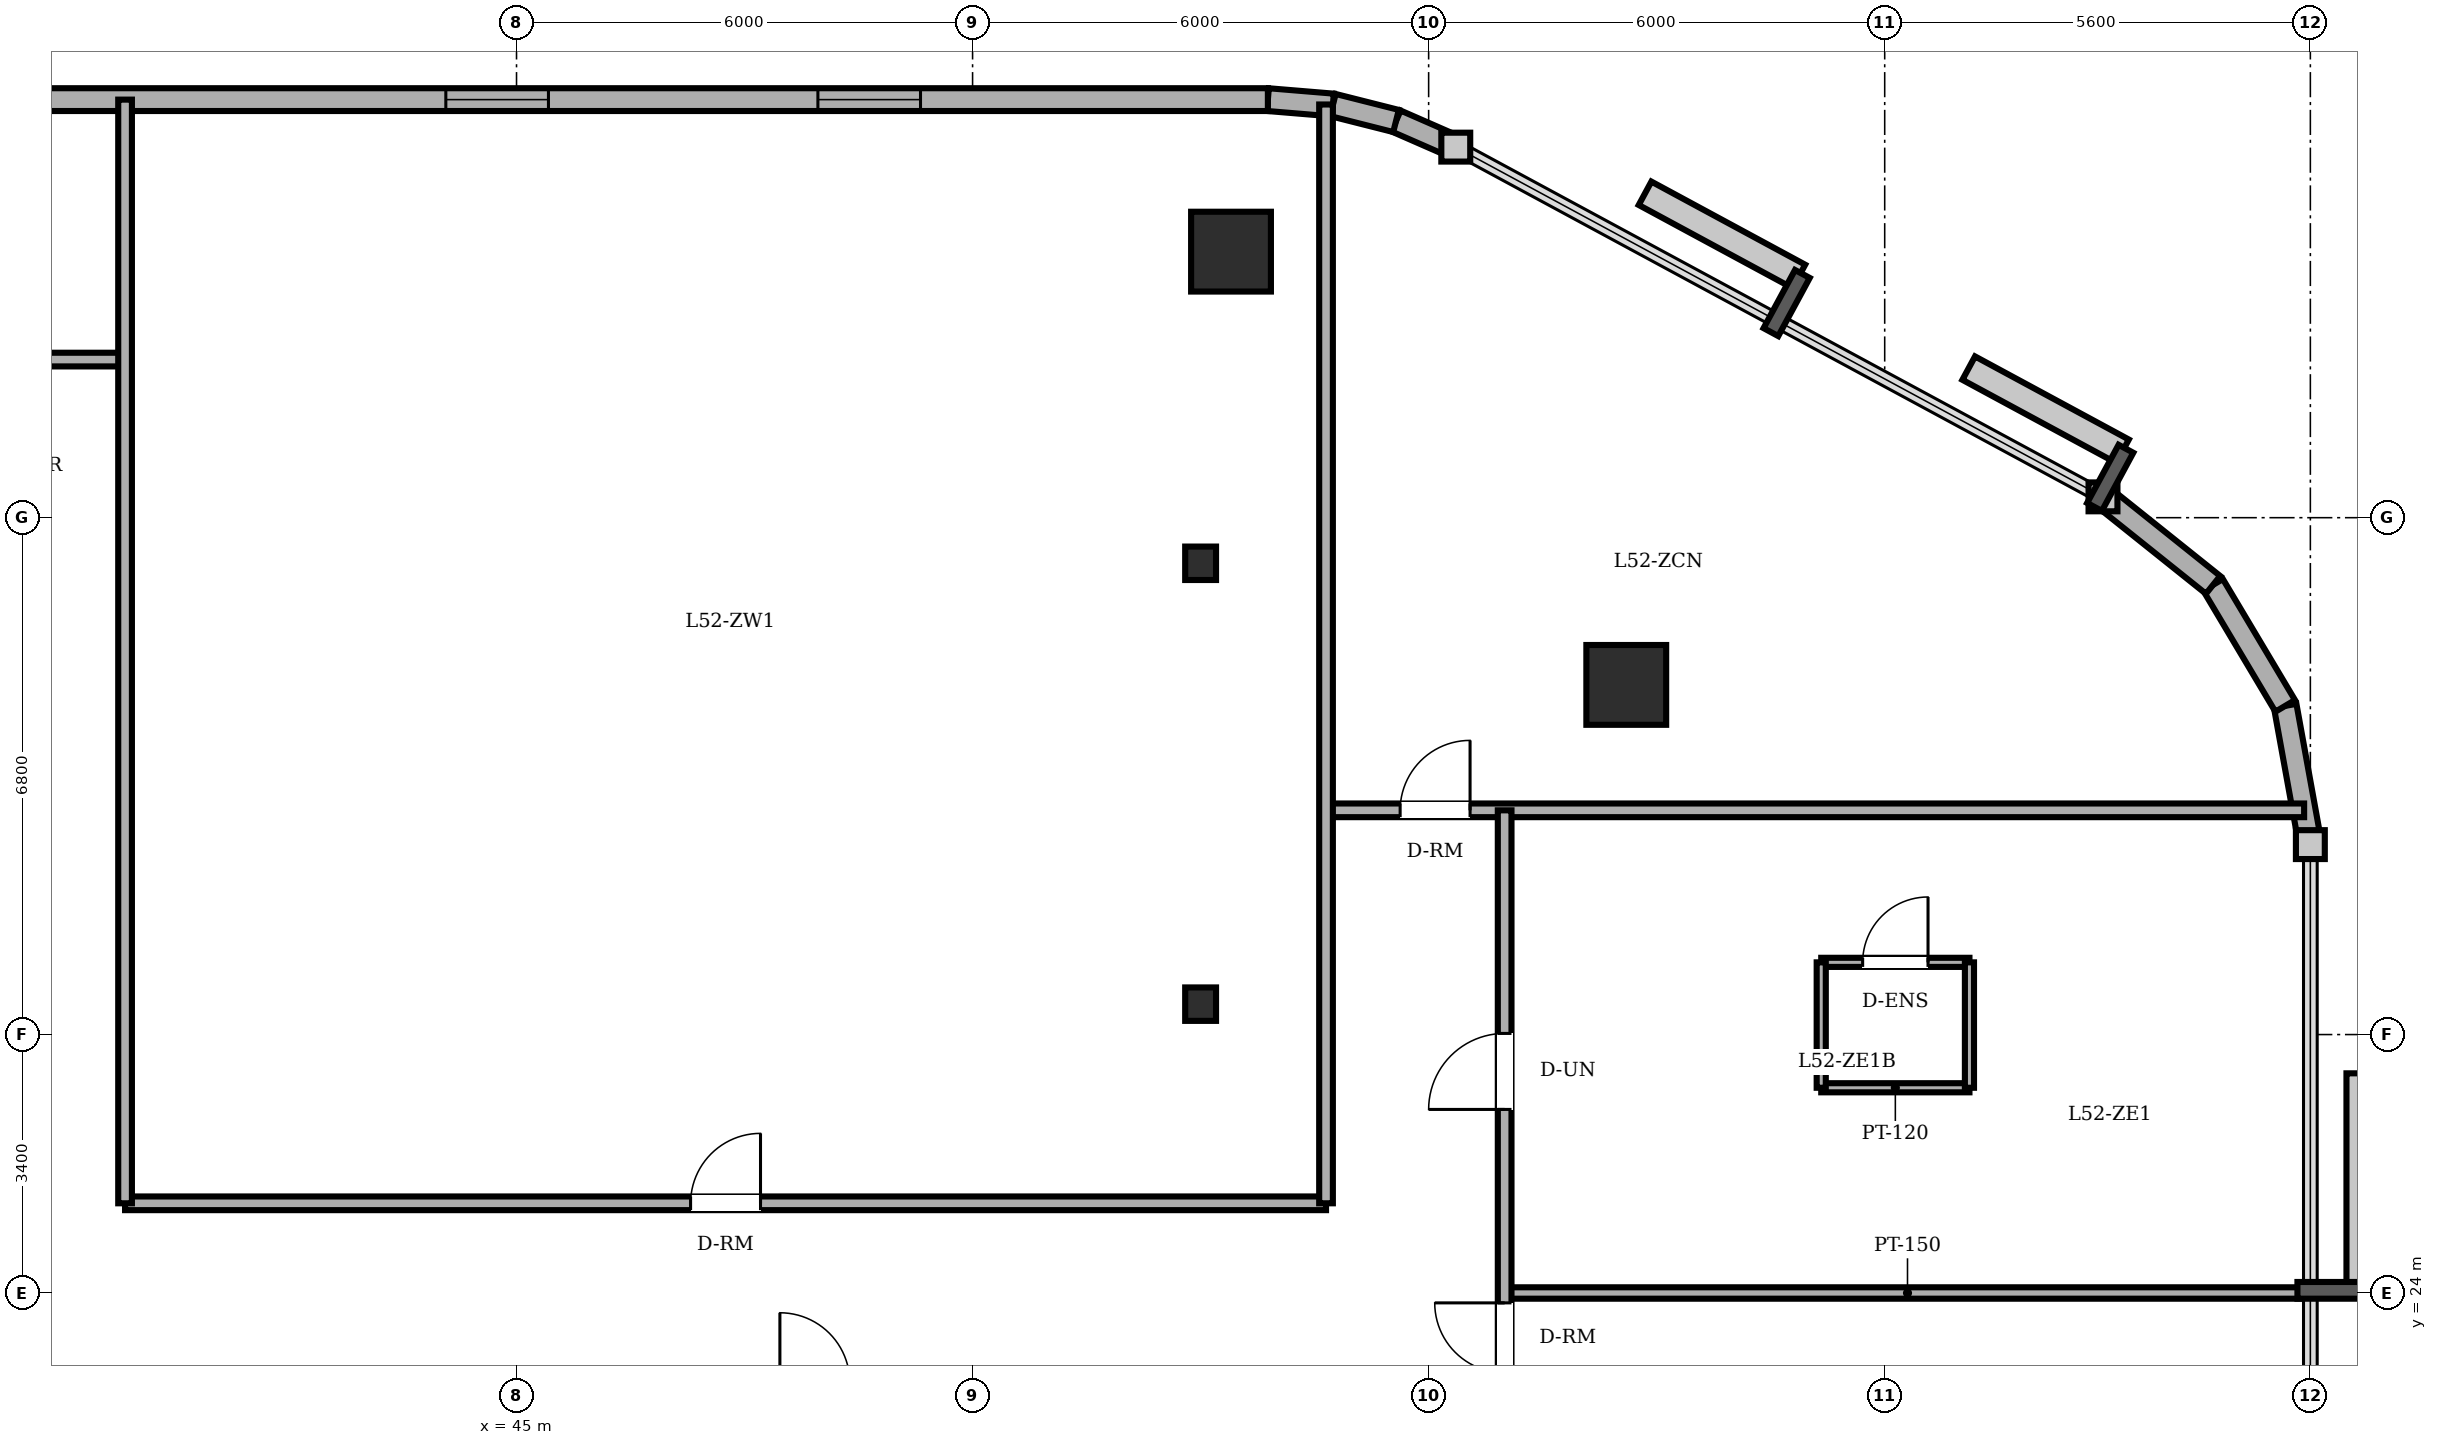
"""IFC4 building model, lengths in metres.
Left out: names, types, materials, properties, quantities, classifications, styles, units other than length and angle.
Written with IfcOpenShell. Run it as: python <this file> out.ifc"""

import sys

from ifc_helpers import new_model, si_unit, direction, frame, frame_2d, origin, origin_2d, place, context, subcontext, project, spatial, rectangle, circle, i_section, extrude, element, fill, save


model = new_model("IFC4")
c1 = context("Model", 3, precision=1e-05, world=origin(), true_north=direction((0.0, 1.0)))
c2 = subcontext(c1, "Body", "Model", "MODEL_VIEW")
j1 = project(units=[si_unit("LENGTHUNIT", "METRE"), si_unit("PLANEANGLEUNIT", "RADIAN")], contexts=[c1])
p1 = place(None, origin())
s1 = spatial("IfcSite", under=j1, at=p1, CompositionType="ELEMENT")
p2 = place(p1, origin())
s2 = spatial("IfcBuilding", under=s1, at=p2, CompositionType="ELEMENT")
p3 = place(p2, frame((0.0, 0.0, 201.3)))
s3 = spatial("IfcBuildingStorey", under=s2, at=p3, CompositionType="ELEMENT", Elevation=201.3)
for number, where, z_axis, x_axis in (
    (1, (59.6, 32.0, 0.0), (0.0, 0.0, 1.0), (1.0, 0.0, 0.0)),
    (2, (54.4, 37.7, 0.0), (0.0, 0.0, 1.0), (1.0, 0.0, 0.0)),
):
    element("IfcColumn", number, at=place(p3, frame(where, z_axis=z_axis, x_axis=x_axis)), inside=s3, PredefinedType="COLUMN", context=c2, shape_type="SweptSolid", body=[
        extrude(circle(Radius=0.525, at=origin_2d()), origin(), (0.0, 0.0, 1.0), 3.6),
    ])
for number, where, z_axis, x_axis in (
    (3, (54.0, 27.8, 0.0), (0.0, 0.0, 1.0), (1.0, 0.0, 0.0)),
    (4, (54.0, 33.6, 0.0), (0.0, 0.0, 1.0), (1.0, 0.0, 0.0)),
):
    element("IfcColumn", number, at=place(p3, frame(where, z_axis=z_axis, x_axis=x_axis)), inside=s3, PredefinedType="COLUMN", context=c2, shape_type="SweptSolid", body=[
        extrude(i_section(OverallWidth=0.406, OverallDepth=0.44, WebThickness=0.024, FlangeThickness=0.039, FilletRadius=0.015, at=origin_2d()), origin(), (0.0, 0.0, 1.0), 3.6),
    ])
p4 = place(p3, frame((68.6, 29.899, 0.0), z_axis=(0.0, 0.0, 1.0), x_axis=(-0.178468469252, 0.983945631365, 0.0)))
e5 = element("IfcWall", 5, at=p4, inside=s3, PredefinedType="SOLIDWALL", context=c2, shape_type="SweptSolid", body=[
    extrude(rectangle(XDim=1.855, YDim=0.3, at=frame_2d((0.927, 0.0))), origin(), (0.0, 0.0, 1.0), 3.4),
])
p5 = place(p3, frame((68.269, 31.724, 0.0), z_axis=(0.0, 0.0, 1.0), x_axis=(-0.512072018927, 0.858942516955, 0.0)))
e6 = element("IfcWall", 6, at=p5, inside=s3, PredefinedType="SOLIDWALL", context=c2, shape_type="SweptSolid", body=[
    extrude(rectangle(XDim=1.853, YDim=0.3, at=frame_2d((0.927, 0.0))), origin(), (0.0, 0.0, 1.0), 3.4),
])
p6 = place(p3, frame((67.32, 33.316, 0.0), z_axis=(0.0, 0.0, 1.0), x_axis=(-0.780920189257, 0.624630817372, 0.0)))
e7 = element("IfcWall", 7, at=p6, inside=s3, PredefinedType="SOLIDWALL", context=c2, shape_type="SweptSolid", body=[
    extrude(rectangle(XDim=1.854, YDim=0.3, at=frame_2d((0.927, 0.0))), origin(), (0.0, 0.0, 1.0), 3.4),
])
p7 = place(p3, frame((57.357, 39.075, 0.0), z_axis=(0.0, 0.0, 1.0), x_axis=(-0.916085473636, 0.400983048261, 0.0)))
e8 = element("IfcWall", 8, at=p7, inside=s3, PredefinedType="SOLIDWALL", context=c2, shape_type="SweptSolid", body=[
    extrude(rectangle(XDim=0.858, YDim=0.3, at=frame_2d((0.429, 0.0))), origin(), (0.0, 0.0, 1.0), 3.4),
])
p8 = place(p3, frame((56.571, 39.419, 0.0), z_axis=(0.0, 0.0, 1.0), x_axis=(-0.969536346338, 0.244947490555, 0.0)))
e9 = element("IfcWall", 9, at=p8, inside=s3, PredefinedType="SOLIDWALL", context=c2, shape_type="SweptSolid", body=[
    extrude(rectangle(XDim=0.857, YDim=0.3, at=frame_2d((0.429, 0.0))), origin(), (0.0, 0.0, 1.0), 3.4),
])
p9 = place(p3, frame((55.74, 39.629, 0.0), z_axis=(0.0, 0.0, 1.0), x_axis=(-0.996565355958, 0.082809971041, 0.0)))
e10 = element("IfcWall", 10, at=p9, inside=s3, PredefinedType="SOLIDWALL", context=c2, shape_type="SweptSolid", body=[
    extrude(rectangle(XDim=0.858, YDim=0.3, at=frame_2d((0.429, 0.0))), origin(), (0.0, 0.0, 1.0), 3.4),
])
p10 = place(p3, frame((54.885, 39.7, 0.0), z_axis=(0.0, 0.0, 1.0), x_axis=(-1.0, 0.0, 0.0)))
e11 = element("IfcWall", 11, at=p10, inside=s3, PredefinedType="SOLIDWALL", context=c2, shape_type="SweptSolid", body=[
    extrude(rectangle(XDim=32.485, YDim=0.3, at=frame_2d((16.243, 0.0))), origin(), (0.0, 0.0, 1.0), 3.4),
])
p11 = place(p10, frame((24.922, 0.0, 0.0)))
e12 = element("IfcOpeningElement", 12, at=p11, cuts=e11, PredefinedType="OPENING", context=c2, shape_type="SweptSolid", body=[
    extrude(rectangle(XDim=0.95, YDim=2.2, at=frame_2d((0.475, 1.1))), frame((0.0, 0.16, 0.0), z_axis=(0.0, -1.0, 0.0), x_axis=(1.0, 0.0, 0.0)), (0.0, 0.0, 1.0), 0.32),
])
p12 = place(p10, frame((4.57, 0.0, 0.85)))
e13 = element("IfcOpeningElement", 13, at=p12, cuts=e11, PredefinedType="OPENING", context=c2, shape_type="SweptSolid", body=[
    extrude(rectangle(XDim=1.35, YDim=1.55, at=frame_2d((0.675, 0.775))), frame((0.0, 0.16, 0.0), z_axis=(0.0, -1.0, 0.0), x_axis=(1.0, 0.0, 0.0)), (0.0, 0.0, 1.0), 0.32),
])
p13 = place(p10, frame((9.465, 0.0, 0.85)))
e14 = element("IfcOpeningElement", 14, at=p13, cuts=e11, PredefinedType="OPENING", context=c2, shape_type="SweptSolid", body=[
    extrude(rectangle(XDim=1.35, YDim=1.55, at=frame_2d((0.675, 0.775))), frame((0.0, 0.16, 0.0), z_axis=(0.0, -1.0, 0.0), x_axis=(1.0, 0.0, 0.0)), (0.0, 0.0, 1.0), 0.32),
])
p14 = place(p10, frame((17.043, 0.0, 0.85)))
e15 = element("IfcOpeningElement", 15, at=p14, cuts=e11, PredefinedType="OPENING", context=c2, shape_type="SweptSolid", body=[
    extrude(rectangle(XDim=1.35, YDim=1.55, at=frame_2d((0.675, 0.775))), frame((0.0, 0.16, 0.0), z_axis=(0.0, -1.0, 0.0), x_axis=(1.0, 0.0, 0.0)), (0.0, 0.0, 1.0), 0.32),
])
p15 = place(p10, frame((19.727, 0.0, 0.85)))
e16 = element("IfcOpeningElement", 16, at=p15, cuts=e11, PredefinedType="OPENING", context=c2, shape_type="SweptSolid", body=[
    extrude(rectangle(XDim=1.35, YDim=1.55, at=frame_2d((0.675, 0.775))), frame((0.0, 0.16, 0.0), z_axis=(0.0, -1.0, 0.0), x_axis=(1.0, 0.0, 0.0)), (0.0, 0.0, 1.0), 0.32),
])
p16 = place(p10, frame((27.91, 0.0, 0.85)))
e17 = element("IfcOpeningElement", 17, at=p16, cuts=e11, PredefinedType="OPENING", context=c2, shape_type="SweptSolid", body=[
    extrude(rectangle(XDim=1.35, YDim=1.55, at=frame_2d((0.675, 0.775))), frame((0.0, 0.16, 0.0), z_axis=(0.0, -1.0, 0.0), x_axis=(1.0, 0.0, 0.0)), (0.0, 0.0, 1.0), 0.32),
])
p17 = place(p10, frame((30.58, 0.0, 0.85)))
e18 = element("IfcOpeningElement", 18, at=p17, cuts=e11, PredefinedType="OPENING", context=c2, shape_type="SweptSolid", body=[
    extrude(rectangle(XDim=1.05, YDim=1.55, at=frame_2d((0.525, 0.775))), frame((0.0, 0.16, 0.0), z_axis=(0.0, -1.0, 0.0), x_axis=(1.0, 0.0, 0.0)), (0.0, 0.0, 1.0), 0.32),
])
p18 = place(p3, frame((62.165, 28.35, 0.0), z_axis=(0.0, 0.0, 1.0), x_axis=(1.0, 0.0, 0.0)))
e19 = element("IfcWall", 19, at=p18, inside=s3, PredefinedType="PARTITIONING", context=c2, shape_type="SweptSolid", body=[
    extrude(rectangle(XDim=1.95, YDim=0.12, at=frame_2d((0.975, 0.0))), origin(), (0.0, 0.0, 1.0), 3.4),
])
p19 = place(p18, frame((0.545, 0.0, 0.0)))
e20 = element("IfcOpeningElement", 20, at=p19, cuts=e19, PredefinedType="OPENING", context=c2, shape_type="SweptSolid", body=[
    extrude(rectangle(XDim=0.86, YDim=2.1, at=frame_2d((0.43, 1.05))), frame((0.0, 0.07, 0.0), z_axis=(0.0, -1.0, 0.0), x_axis=(1.0, 0.0, 0.0)), (0.0, 0.0, 1.0), 0.14),
])
p20 = place(p3, frame((64.115, 26.7, 0.0), z_axis=(0.0, 0.0, 1.0), x_axis=(-1.0, 0.0, 0.0)))
e21 = element("IfcWall", 21, at=p20, inside=s3, PredefinedType="PARTITIONING", context=c2, shape_type="SweptSolid", body=[
    extrude(rectangle(XDim=1.95, YDim=0.12, at=frame_2d((0.975, 0.0))), origin(), (0.0, 0.0, 1.0), 3.4),
])
for number, where, z_axis, x_axis in (
    (22, (62.165, 28.35, 0.0), (0.0, 0.0, 1.0), (0.0, -1.0, 0.0)),
    (23, (64.115, 26.7, 0.0), (0.0, 0.0, 1.0), (0.0, 1.0, 0.0)),
):
    element("IfcWall", number, at=place(p3, frame(where, z_axis=z_axis, x_axis=x_axis)), inside=s3, PredefinedType="PARTITIONING", context=c2, shape_type="SweptSolid", body=[
        extrude(rectangle(XDim=1.65, YDim=0.12, at=frame_2d((0.825, 0.0))), origin(), (0.0, 0.0, 1.0), 3.4),
    ])
p21 = place(p3, frame((58.0, 24.0, 0.0), z_axis=(0.0, 0.0, 1.0), x_axis=(1.0, 0.0, 0.0)))
e24 = element("IfcWall", 24, at=p21, inside=s3, PredefinedType="PARTITIONING", context=c2, shape_type="SweptSolid", body=[
    extrude(rectangle(XDim=10.6, YDim=0.15, at=frame_2d((5.3, 0.0))), origin(), (0.0, 0.0, 1.0), 3.022),
])
p22 = place(p3, frame((39.85, 25.18, 0.0), z_axis=(0.0, 0.0, 1.0), x_axis=(1.0, 0.0, 0.0)))
e25 = element("IfcWall", 25, at=p22, inside=s3, PredefinedType="PARTITIONING", context=c2, shape_type="SweptSolid", body=[
    extrude(rectangle(XDim=15.8, YDim=0.18, at=frame_2d((7.9, 0.0))), origin(), (0.0, 0.0, 1.0), 3.4),
])
p23 = place(p22, frame((7.44, 0.0, 0.0)))
e26 = element("IfcOpeningElement", 26, at=p23, cuts=e25, PredefinedType="OPENING", context=c2, shape_type="SweptSolid", body=[
    extrude(rectangle(XDim=0.92, YDim=2.1, at=frame_2d((0.46, 1.05))), frame((0.0, 0.1, 0.0), z_axis=(0.0, -1.0, 0.0), x_axis=(1.0, 0.0, 0.0)), (0.0, 0.0, 1.0), 0.2),
])
p24 = place(p3, frame((55.65, 30.35, 0.0), z_axis=(0.0, 0.0, 1.0), x_axis=(1.0, 0.0, 0.0)))
e27 = element("IfcWall", 27, at=p24, inside=s3, PredefinedType="PARTITIONING", context=c2, shape_type="SweptSolid", body=[
    extrude(rectangle(XDim=12.868, YDim=0.18, at=frame_2d((6.434, 0.0))), origin(), (0.0, 0.0, 1.0), 3.4),
])
p25 = place(p24, frame((0.975, 0.0, 0.0)))
e28 = element("IfcOpeningElement", 28, at=p25, cuts=e27, PredefinedType="OPENING", context=c2, shape_type="SweptSolid", body=[
    extrude(rectangle(XDim=0.92, YDim=2.1, at=frame_2d((0.46, 1.05))), frame((0.0, 0.1, 0.0), z_axis=(0.0, -1.0, 0.0), x_axis=(1.0, 0.0, 0.0)), (0.0, 0.0, 1.0), 0.2),
])
p26 = place(p3, frame((17.677, 36.28, 0.0), z_axis=(0.0, 0.0, 1.0), x_axis=(1.0, 0.0, 0.0)))
e29 = element("IfcWall", 29, at=p26, inside=s3, PredefinedType="PARTITIONING", context=c2, shape_type="SweptSolid", body=[
    extrude(rectangle(XDim=22.173, YDim=0.18, at=frame_2d((11.086, 0.0))), origin(), (0.0, 0.0, 1.0), 3.4),
])
p27 = place(p26, frame((8.173, 0.0, 0.0)))
e30 = element("IfcOpeningElement", 30, at=p27, cuts=e29, PredefinedType="OPENING", context=c2, shape_type="SweptSolid", body=[
    extrude(rectangle(XDim=0.9, YDim=2.1, at=frame_2d((0.45, 1.05))), frame((0.0, 0.1, 0.0), z_axis=(0.0, -1.0, 0.0), x_axis=(1.0, 0.0, 0.0)), (0.0, 0.0, 1.0), 0.2),
])
p28 = place(p26, frame((11.793, 0.0, 0.0)))
e31 = element("IfcOpeningElement", 31, at=p28, cuts=e29, PredefinedType="OPENING", context=c2, shape_type="SweptSolid", body=[
    extrude(rectangle(XDim=0.86, YDim=2.1, at=frame_2d((0.43, 1.05))), frame((0.0, 0.1, 0.0), z_axis=(0.0, -1.0, 0.0), x_axis=(1.0, 0.0, 0.0)), (0.0, 0.0, 1.0), 0.2),
])
p29 = place(p26, frame((4.479, 0.0, 0.0)))
e32 = element("IfcOpeningElement", 32, at=p29, cuts=e29, PredefinedType="OPENING", context=c2, shape_type="SweptSolid", body=[
    extrude(rectangle(XDim=0.92, YDim=2.1, at=frame_2d((0.46, 1.05))), frame((0.0, 0.1, 0.0), z_axis=(0.0, -1.0, 0.0), x_axis=(1.0, 0.0, 0.0)), (0.0, 0.0, 1.0), 0.2),
])
p30 = place(p26, frame((17.428, 0.0, 0.0)))
e33 = element("IfcOpeningElement", 33, at=p30, cuts=e29, PredefinedType="OPENING", context=c2, shape_type="SweptSolid", body=[
    extrude(rectangle(XDim=0.92, YDim=2.1, at=frame_2d((0.46, 1.05))), frame((0.0, 0.1, 0.0), z_axis=(0.0, -1.0, 0.0), x_axis=(1.0, 0.0, 0.0)), (0.0, 0.0, 1.0), 0.2),
])
p31 = place(p3, frame((39.85, 25.18, 0.0), z_axis=(0.0, 0.0, 1.0), x_axis=(0.0, 1.0, 0.0)))
e34 = element("IfcWall", 34, at=p31, inside=s3, PredefinedType="PARTITIONING", context=c2, shape_type="SweptSolid", body=[
    extrude(rectangle(XDim=14.52, YDim=0.18, at=frame_2d((7.26, 0.0))), origin(), (0.0, 0.0, 1.0), 3.4),
])
p32 = place(p3, frame((55.65, 25.18, 0.0), z_axis=(0.0, 0.0, 1.0), x_axis=(0.0, 1.0, 0.0)))
e35 = element("IfcWall", 35, at=p32, inside=s3, PredefinedType="PARTITIONING", context=c2, shape_type="SweptSolid", body=[
    extrude(rectangle(XDim=14.456, YDim=0.18, at=frame_2d((7.228, 0.0))), origin(), (0.0, 0.0, 1.0), 3.4),
])
p33 = place(p3, frame((58.0, 9.272, 0.0), z_axis=(0.0, 0.0, 1.0), x_axis=(0.0, 1.0, 0.0)))
e36 = element("IfcWall", 36, at=p33, inside=s3, PredefinedType="PARTITIONING", context=c2, shape_type="SweptSolid", body=[
    extrude(rectangle(XDim=21.078, YDim=0.18, at=frame_2d((10.539, 0.0))), origin(), (0.0, 0.0, 1.0), 3.4),
])
p34 = place(p33, frame((17.143, 0.0, 0.0)))
e37 = element("IfcOpeningElement", 37, at=p34, cuts=e36, PredefinedType="OPENING", context=c2, shape_type="SweptSolid", body=[
    extrude(rectangle(XDim=1.0, YDim=2.15, at=frame_2d((0.5, 1.075))), frame((0.0, 0.1, 0.0), z_axis=(0.0, -1.0, 0.0), x_axis=(1.0, 0.0, 0.0)), (0.0, 0.0, 1.0), 0.2),
])
p35 = place(p33, frame((13.678, 0.0, 0.0)))
e38 = element("IfcOpeningElement", 38, at=p35, cuts=e36, PredefinedType="OPENING", context=c2, shape_type="SweptSolid", body=[
    extrude(rectangle(XDim=0.92, YDim=2.1, at=frame_2d((0.46, 1.05))), frame((0.0, 0.1, 0.0), z_axis=(0.0, -1.0, 0.0), x_axis=(1.0, 0.0, 0.0)), (0.0, 0.0, 1.0), 0.2),
])
p36 = place(p12, origin())
e39 = element("IfcWindow", 39, at=p36, inside=s3, PartitioningType="SINGLE_PANEL", PredefinedType="WINDOW", context=c2, shape_type="SweptSolid", body=[
    extrude(rectangle(XDim=1.35, YDim=1.55, at=frame_2d((0.675, 0.775))), frame((0.0, 0.03, 0.0), z_axis=(0.0, -1.0, 0.0), x_axis=(1.0, 0.0, 0.0)), (0.0, 0.0, 1.0), 0.06),
])
fill(e13, e39)
p37 = place(p13, origin())
e40 = element("IfcWindow", 40, at=p37, inside=s3, PartitioningType="SINGLE_PANEL", PredefinedType="WINDOW", context=c2, shape_type="SweptSolid", body=[
    extrude(rectangle(XDim=1.35, YDim=1.55, at=frame_2d((0.675, 0.775))), frame((0.0, 0.03, 0.0), z_axis=(0.0, -1.0, 0.0), x_axis=(1.0, 0.0, 0.0)), (0.0, 0.0, 1.0), 0.06),
])
fill(e14, e40)
p38 = place(p19, origin())
e41 = element("IfcDoor", 41, at=p38, inside=s3, OperationType="SINGLE_SWING_RIGHT", PredefinedType="DOOR", context=c2, shape_type="SweptSolid", body=[
    extrude(rectangle(XDim=0.86, YDim=2.1, at=frame_2d((0.43, 1.05))), frame((0.0, 0.025, 0.0), z_axis=(0.0, -1.0, 0.0), x_axis=(1.0, 0.0, 0.0)), (0.0, 0.0, 1.0), 0.05),
])
fill(e20, e41)
p39 = place(p23, origin())
e42 = element("IfcDoor", 42, at=p39, inside=s3, OperationType="SINGLE_SWING_RIGHT", PredefinedType="DOOR", context=c2, shape_type="SweptSolid", body=[
    extrude(rectangle(XDim=0.92, YDim=2.1, at=frame_2d((0.46, 1.05))), frame((0.0, 0.025, 0.0), z_axis=(0.0, -1.0, 0.0), x_axis=(1.0, 0.0, 0.0)), (0.0, 0.0, 1.0), 0.05),
])
fill(e26, e42)
p40 = place(p25, origin())
e43 = element("IfcDoor", 43, at=p40, inside=s3, OperationType="SINGLE_SWING_RIGHT", PredefinedType="DOOR", context=c2, shape_type="SweptSolid", body=[
    extrude(rectangle(XDim=0.92, YDim=2.1, at=frame_2d((0.46, 1.05))), frame((0.0, 0.025, 0.0), z_axis=(0.0, -1.0, 0.0), x_axis=(1.0, 0.0, 0.0)), (0.0, 0.0, 1.0), 0.05),
])
fill(e28, e43)
p41 = place(p34, origin())
e44 = element("IfcDoor", 44, at=p41, inside=s3, OperationType="SINGLE_SWING_LEFT", PredefinedType="DOOR", context=c2, shape_type="SweptSolid", body=[
    extrude(rectangle(XDim=1.0, YDim=2.15, at=frame_2d((0.5, 1.075))), frame((0.0, 0.025, 0.0), z_axis=(0.0, -1.0, 0.0), x_axis=(1.0, 0.0, 0.0)), (0.0, 0.0, 1.0), 0.05),
])
fill(e37, e44)
p42 = place(p35, origin())
e45 = element("IfcDoor", 45, at=p42, inside=s3, OperationType="SINGLE_SWING_RIGHT", PredefinedType="DOOR", context=c2, shape_type="SweptSolid", body=[
    extrude(rectangle(XDim=0.92, YDim=2.1, at=frame_2d((0.46, 1.05))), frame((0.0, 0.025, 0.0), z_axis=(0.0, -1.0, 0.0), x_axis=(1.0, 0.0, 0.0)), (0.0, 0.0, 1.0), 0.05),
])
fill(e38, e45)
save(model, sys.argv[1])
